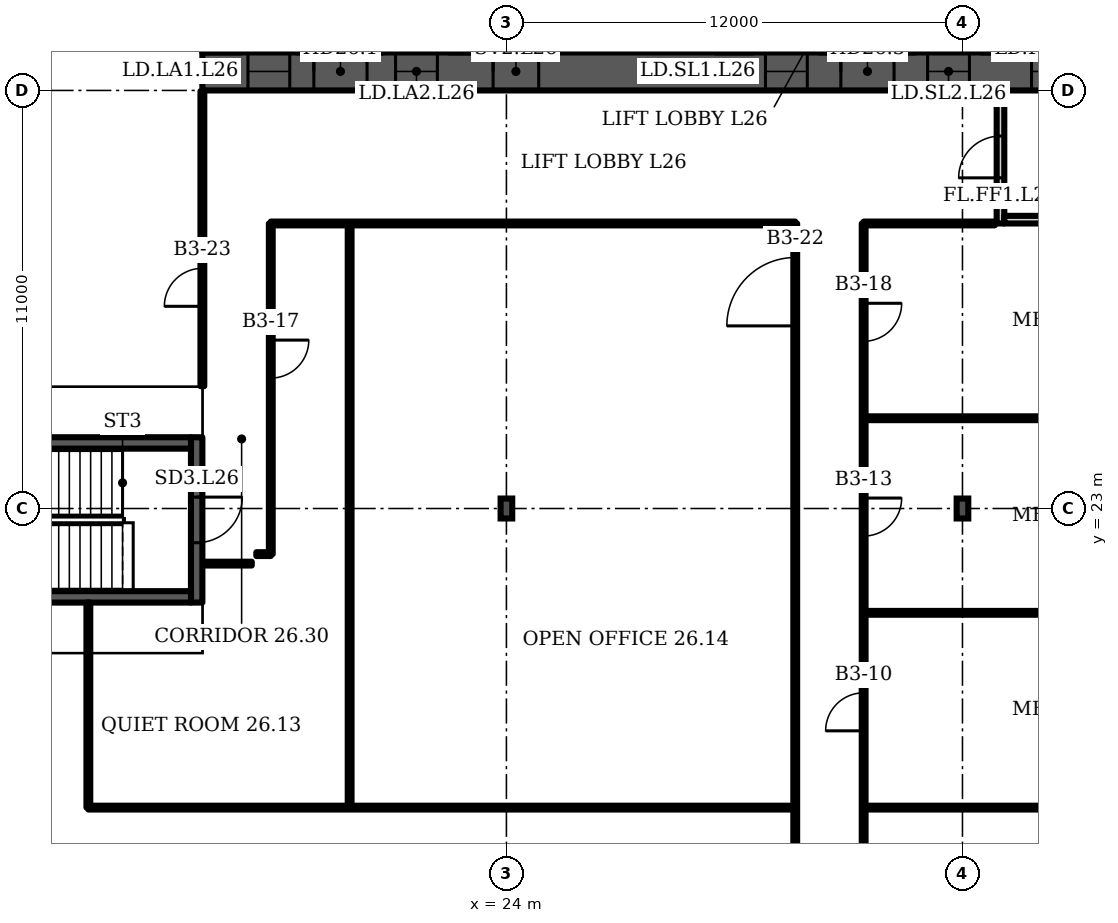
"""IFC4 building model, lengths in metres.
Left out: names, types, materials, properties, quantities, classifications, styles, units other than length and angle.
Written with IfcOpenShell. Run it as: python <this file> out.ifc"""

import sys

from ifc_helpers import new_model, si_unit, direction, frame, frame_2d, origin, origin_2d, place, context, subcontext, project, spatial, rectangle, i_section, extrude, element, fill, save


model = new_model("IFC4")
c1 = context("Model", 3, precision=1e-05, world=origin(), true_north=direction((0.0, 1.0)))
c2 = subcontext(c1, "Body", "Model", "MODEL_VIEW")
j1 = project(units=[si_unit("LENGTHUNIT", "METRE"), si_unit("PLANEANGLEUNIT", "RADIAN")], contexts=[c1])
p1 = place(None, origin())
s1 = spatial("IfcSite", under=j1, at=p1, CompositionType="ELEMENT")
p2 = place(p1, origin())
s2 = spatial("IfcBuilding", under=s1, at=p2, CompositionType="ELEMENT")
p3 = place(p2, frame((0.0, 0.0, 114.7)))
s3 = spatial("IfcBuildingStorey", under=s2, at=p3, CompositionType="ELEMENT", Elevation=114.7)
p4 = place(p3, frame((16.0, 34.5, 0.0), z_axis=(0.0, 0.0, 1.0), x_axis=(1.0, 0.0, 0.0)))
e1 = element("IfcWall", 1, at=p4, inside=s3, PredefinedType="SHEAR", context=c2, shape_type="SweptSolid", body=[
    extrude(rectangle(XDim=49.0, YDim=1.0, at=frame_2d((24.5, 0.0))), origin(), (0.0, 0.0, 1.0), 3.6),
])
p5 = place(p4, frame((1.2, 0.0, 0.0)))
e2 = element("IfcOpeningElement", 2, at=p5, cuts=e1, PredefinedType="OPENING", context=c2, shape_type="SweptSolid", body=[
    extrude(rectangle(XDim=1.1, YDim=2.1, at=frame_2d((0.55, 1.05))), frame((0.0, 0.51, 0.0), z_axis=(0.0, -1.0, 0.0), x_axis=(1.0, 0.0, 0.0)), (0.0, 0.0, 1.0), 1.02),
])
p6 = place(p4, frame((5.083, 0.0, 0.0)))
e3 = element("IfcOpeningElement", 3, at=p6, cuts=e1, PredefinedType="OPENING", context=c2, shape_type="SweptSolid", body=[
    extrude(rectangle(XDim=1.1, YDim=2.1, at=frame_2d((0.55, 1.05))), frame((0.0, 0.51, 0.0), z_axis=(0.0, -1.0, 0.0), x_axis=(1.0, 0.0, 0.0)), (0.0, 0.0, 1.0), 1.02),
])
p7 = place(p4, frame((2.933, 0.0, 0.0)))
e4 = element("IfcOpeningElement", 4, at=p7, cuts=e1, PredefinedType="OPENING", context=c2, shape_type="SweptSolid", body=[
    extrude(rectangle(XDim=1.4, YDim=2.1, at=frame_2d((0.7, 1.05))), frame((0.0, 0.51, 0.0), z_axis=(0.0, -1.0, 0.0), x_axis=(1.0, 0.0, 0.0)), (0.0, 0.0, 1.0), 1.02),
])
p8 = place(p4, frame((7.65, 0.0, 0.0)))
e5 = element("IfcOpeningElement", 5, at=p8, cuts=e1, PredefinedType="OPENING", context=c2, shape_type="SweptSolid", body=[
    extrude(rectangle(XDim=1.2, YDim=2.1, at=frame_2d((0.6, 1.05))), frame((0.0, 0.51, 0.0), z_axis=(0.0, -1.0, 0.0), x_axis=(1.0, 0.0, 0.0)), (0.0, 0.0, 1.0), 1.02),
])
p9 = place(p4, frame((14.817, 0.0, 0.0)))
e6 = element("IfcOpeningElement", 6, at=p9, cuts=e1, PredefinedType="OPENING", context=c2, shape_type="SweptSolid", body=[
    extrude(rectangle(XDim=1.1, YDim=2.1, at=frame_2d((0.55, 1.05))), frame((0.0, 0.51, 0.0), z_axis=(0.0, -1.0, 0.0), x_axis=(1.0, 0.0, 0.0)), (0.0, 0.0, 1.0), 1.02),
])
p10 = place(p4, frame((19.083, 0.0, 0.0)))
e7 = element("IfcOpeningElement", 7, at=p10, cuts=e1, PredefinedType="OPENING", context=c2, shape_type="SweptSolid", body=[
    extrude(rectangle(XDim=1.1, YDim=2.1, at=frame_2d((0.55, 1.05))), frame((0.0, 0.51, 0.0), z_axis=(0.0, -1.0, 0.0), x_axis=(1.0, 0.0, 0.0)), (0.0, 0.0, 1.0), 1.02),
])
p11 = place(p4, frame((16.8, 0.0, 0.0)))
e8 = element("IfcOpeningElement", 8, at=p11, cuts=e1, PredefinedType="OPENING", context=c2, shape_type="SweptSolid", body=[
    extrude(rectangle(XDim=1.4, YDim=2.1, at=frame_2d((0.7, 1.05))), frame((0.0, 0.51, 0.0), z_axis=(0.0, -1.0, 0.0), x_axis=(1.0, 0.0, 0.0)), (0.0, 0.0, 1.0), 1.02),
])
p12 = place(p4, frame((21.817, 0.0, 0.0)))
e9 = element("IfcOpeningElement", 9, at=p12, cuts=e1, PredefinedType="OPENING", context=c2, shape_type="SweptSolid", body=[
    extrude(rectangle(XDim=1.1, YDim=2.1, at=frame_2d((0.55, 1.05))), frame((0.0, 0.51, 0.0), z_axis=(0.0, -1.0, 0.0), x_axis=(1.0, 0.0, 0.0)), (0.0, 0.0, 1.0), 1.02),
])
p13 = place(p4, frame((26.083, 0.0, 0.0)))
e10 = element("IfcOpeningElement", 10, at=p13, cuts=e1, PredefinedType="OPENING", context=c2, shape_type="SweptSolid", body=[
    extrude(rectangle(XDim=1.1, YDim=2.1, at=frame_2d((0.55, 1.05))), frame((0.0, 0.51, 0.0), z_axis=(0.0, -1.0, 0.0), x_axis=(1.0, 0.0, 0.0)), (0.0, 0.0, 1.0), 1.02),
])
p14 = place(p4, frame((33.15, 0.0, 0.0)))
e11 = element("IfcOpeningElement", 11, at=p14, cuts=e1, PredefinedType="OPENING", context=c2, shape_type="SweptSolid", body=[
    extrude(rectangle(XDim=1.2, YDim=2.1, at=frame_2d((0.6, 1.05))), frame((0.0, 0.51, 0.0), z_axis=(0.0, -1.0, 0.0), x_axis=(1.0, 0.0, 0.0)), (0.0, 0.0, 1.0), 1.02),
])
p15 = place(p4, frame((37.8, 0.0, 0.0)))
e12 = element("IfcOpeningElement", 12, at=p15, cuts=e1, PredefinedType="OPENING", context=c2, shape_type="SweptSolid", body=[
    extrude(rectangle(XDim=1.4, YDim=2.1, at=frame_2d((0.7, 1.05))), frame((0.0, 0.51, 0.0), z_axis=(0.0, -1.0, 0.0), x_axis=(1.0, 0.0, 0.0)), (0.0, 0.0, 1.0), 1.02),
])
p16 = place(p4, frame((42.817, 0.0, 0.0)))
e13 = element("IfcOpeningElement", 13, at=p16, cuts=e1, PredefinedType="OPENING", context=c2, shape_type="SweptSolid", body=[
    extrude(rectangle(XDim=1.1, YDim=2.1, at=frame_2d((0.55, 1.05))), frame((0.0, 0.51, 0.0), z_axis=(0.0, -1.0, 0.0), x_axis=(1.0, 0.0, 0.0)), (0.0, 0.0, 1.0), 1.02),
])
p17 = place(p4, frame((46.7, 0.0, 0.0)))
e14 = element("IfcOpeningElement", 14, at=p17, cuts=e1, PredefinedType="OPENING", context=c2, shape_type="SweptSolid", body=[
    extrude(rectangle(XDim=1.1, YDim=2.1, at=frame_2d((0.55, 1.05))), frame((0.0, 0.51, 0.0), z_axis=(0.0, -1.0, 0.0), x_axis=(1.0, 0.0, 0.0)), (0.0, 0.0, 1.0), 1.02),
])
p18 = place(p4, frame((44.667, 0.0, 0.0)))
e15 = element("IfcOpeningElement", 15, at=p18, cuts=e1, PredefinedType="OPENING", context=c2, shape_type="SweptSolid", body=[
    extrude(rectangle(XDim=1.4, YDim=2.1, at=frame_2d((0.7, 1.05))), frame((0.0, 0.51, 0.0), z_axis=(0.0, -1.0, 0.0), x_axis=(1.0, 0.0, 0.0)), (0.0, 0.0, 1.0), 1.02),
])
for number, where, z_axis, x_axis in (
    (16, (24.0, 23.0, 0.0), (0.0, 0.0, 1.0), (1.0, 0.0, 0.0)),
    (17, (36.0, 23.0, 0.0), (0.0, 0.0, 1.0), (1.0, 0.0, 0.0)),
):
    element("IfcColumn", number, at=place(p3, frame(where, z_axis=z_axis, x_axis=x_axis)), inside=s3, PredefinedType="COLUMN", context=c2, shape_type="SweptSolid", body=[
        extrude(i_section(OverallWidth=0.306, OverallDepth=0.524, WebThickness=0.021, FlangeThickness=0.04, FilletRadius=0.027, at=origin_2d()), origin(), (0.0, 0.0, 1.0), 3.6),
    ])
p19 = place(p3, frame((37.0, 30.5, 0.0), z_axis=(0.0, 0.0, 1.0), x_axis=(0.0, 1.0, 0.0)))
e18 = element("IfcWall", 18, at=p19, inside=s3, PredefinedType="PARTITIONING", context=c2, shape_type="SweptSolid", body=[
    extrude(rectangle(XDim=3.5, YDim=0.2, at=frame_2d((1.75, 0.0))), origin(), (0.0, 0.0, 1.0), 3.2),
])
p20 = place(p19, frame((1.2, 0.0, 0.0)))
e19 = element("IfcOpeningElement", 19, at=p20, cuts=e18, PredefinedType="OPENING", context=c2, shape_type="SweptSolid", body=[
    extrude(rectangle(XDim=1.1, YDim=2.1, at=frame_2d((0.55, 1.05))), frame((0.0, 0.11, 0.0), z_axis=(0.0, -1.0, 0.0), x_axis=(1.0, 0.0, 0.0)), (0.0, 0.0, 1.0), 0.22),
])
p21 = place(p3, frame((37.1, 30.6, 0.0), z_axis=(0.0, 0.0, 1.0), x_axis=(1.0, 0.0, 0.0)))
e20 = element("IfcWall", 20, at=p21, inside=s3, PredefinedType="PARTITIONING", context=c2, shape_type="SweptSolid", body=[
    extrude(rectangle(XDim=2.8, YDim=0.2, at=frame_2d((1.4, 0.0))), origin(), (0.0, 0.0, 1.0), 3.2),
])
p22 = place(p3, frame((15.85, 20.525, 0.0), z_axis=(0.0, 0.0, 1.0), x_axis=(0.0, 1.0, 0.0)))
e21 = element("IfcWall", 21, at=p22, inside=s3, PredefinedType="SHEAR", context=c2, shape_type="SweptSolid", body=[
    extrude(rectangle(XDim=4.35, YDim=0.3, at=frame_2d((2.175, 0.0))), origin(), (0.0, 0.0, 1.0), 3.2),
])
p23 = place(p22, frame((1.575, 0.0, 0.0)))
e22 = element("IfcOpeningElement", 22, at=p23, cuts=e21, PredefinedType="OPENING", context=c2, shape_type="SweptSolid", body=[
    extrude(rectangle(XDim=1.2, YDim=2.1, at=frame_2d((0.6, 1.05))), frame((0.0, 0.16, 0.0), z_axis=(0.0, -1.0, 0.0), x_axis=(1.0, 0.0, 0.0)), (0.0, 0.0, 1.0), 0.32),
])
p24 = place(p3, frame((13.0, 15.13, 0.0), z_axis=(0.0, 0.0, 1.0), x_axis=(0.0, 1.0, 0.0)))
e23 = element("IfcWall", 23, at=p24, inside=s3, PredefinedType="PARTITIONING", context=c2, shape_type="SweptSolid", body=[
    extrude(rectangle(XDim=5.395, YDim=0.1, at=frame_2d((2.698, 0.0))), origin(), (0.0, 0.0, 1.0), 3.2),
])
p25 = place(p3, frame((13.0, 15.13, 0.0), z_axis=(0.0, 0.0, 1.0), x_axis=(1.0, 0.0, 0.0)))
e24 = element("IfcWall", 24, at=p25, inside=s3, PredefinedType="PARTITIONING", context=c2, shape_type="SweptSolid", body=[
    extrude(rectangle(XDim=18.6, YDim=0.1, at=frame_2d((9.3, 0.0))), origin(), (0.0, 0.0, 1.0), 3.2),
])
p26 = place(p3, frame((16.0, 26.22, 0.0), z_axis=(0.0, 0.0, 1.0), x_axis=(0.0, 1.0, 0.0)))
e25 = element("IfcWall", 25, at=p26, inside=s3, PredefinedType="PARTITIONING", context=c2, shape_type="SweptSolid", body=[
    extrude(rectangle(XDim=7.76, YDim=0.1, at=frame_2d((3.88, 0.0))), origin(), (0.0, 0.0, 1.0), 3.2),
])
p27 = place(p26, frame((2.1, 0.0, 0.0)))
e26 = element("IfcOpeningElement", 26, at=p27, cuts=e25, PredefinedType="OPENING", context=c2, shape_type="SweptSolid", body=[
    extrude(rectangle(XDim=1.0, YDim=2.1, at=frame_2d((0.5, 1.05))), frame((0.0, 0.06, 0.0), z_axis=(0.0, -1.0, 0.0), x_axis=(1.0, 0.0, 0.0)), (0.0, 0.0, 1.0), 0.12),
])
p28 = place(p3, frame((16.02, 21.55, 0.0), z_axis=(0.0, 0.0, 1.0), x_axis=(1.0, 0.0, 0.0)))
e27 = element("IfcWall", 27, at=p28, inside=s3, PredefinedType="PARTITIONING", context=c2, shape_type="SweptSolid", body=[
    extrude(rectangle(XDim=1.28, YDim=0.1, at=frame_2d((0.64, 0.0))), origin(), (0.0, 0.0, 1.0), 3.2),
])
p29 = place(p3, frame((17.42, 21.8, 0.0), z_axis=(0.0, 0.0, 1.0), x_axis=(1.0, 0.0, 0.0)))
e28 = element("IfcWall", 28, at=p29, inside=s3, PredefinedType="PARTITIONING", context=c2, shape_type="SweptSolid", body=[
    extrude(rectangle(XDim=0.38, YDim=0.1, at=frame_2d((0.19, 0.0))), origin(), (0.0, 0.0, 1.0), 3.2),
])
p30 = place(p3, frame((17.8, 21.8, 0.0), z_axis=(0.0, 0.0, 1.0), x_axis=(0.0, 1.0, 0.0)))
e29 = element("IfcWall", 29, at=p30, inside=s3, PredefinedType="PARTITIONING", context=c2, shape_type="SweptSolid", body=[
    extrude(rectangle(XDim=8.7, YDim=0.1, at=frame_2d((4.35, 0.0))), origin(), (0.0, 0.0, 1.0), 3.2),
])
p31 = place(p30, frame((4.631, 0.0, 0.0)))
e30 = element("IfcOpeningElement", 30, at=p31, cuts=e29, PredefinedType="OPENING", context=c2, shape_type="SweptSolid", body=[
    extrude(rectangle(XDim=1.0, YDim=2.1, at=frame_2d((0.5, 1.05))), frame((0.0, 0.06, 0.0), z_axis=(0.0, -1.0, 0.0), x_axis=(1.0, 0.0, 0.0)), (0.0, 0.0, 1.0), 0.12),
])
p32 = place(p3, frame((17.8, 30.5, 0.0), z_axis=(0.0, 0.0, 1.0), x_axis=(1.0, 0.0, 0.0)))
e31 = element("IfcWall", 31, at=p32, inside=s3, PredefinedType="PARTITIONING", context=c2, shape_type="SweptSolid", body=[
    extrude(rectangle(XDim=13.8, YDim=0.1, at=frame_2d((6.9, 0.0))), origin(), (0.0, 0.0, 1.0), 3.2),
])
p33 = place(p3, frame((19.875, 15.13, 0.0), z_axis=(0.0, 0.0, 1.0), x_axis=(0.0, 1.0, 0.0)))
e32 = element("IfcWall", 32, at=p33, inside=s3, PredefinedType="PARTITIONING", context=c2, shape_type="SweptSolid", body=[
    extrude(rectangle(XDim=15.37, YDim=0.1, at=frame_2d((7.685, 0.0))), origin(), (0.0, 0.0, 1.0), 3.2),
])
p34 = place(p3, frame((31.6, 0.56, 0.0), z_axis=(0.0, 0.0, 1.0), x_axis=(0.0, 1.0, 0.0)))
e33 = element("IfcWall", 33, at=p34, inside=s3, PredefinedType="PARTITIONING", context=c2, shape_type="SweptSolid", body=[
    extrude(rectangle(XDim=29.94, YDim=0.1, at=frame_2d((14.97, 0.0))), origin(), (0.0, 0.0, 1.0), 3.2),
])
p35 = place(p34, frame((6.75, 0.0, 0.0)))
e34 = element("IfcOpeningElement", 34, at=p35, cuts=e33, PredefinedType="OPENING", context=c2, shape_type="SweptSolid", body=[
    extrude(rectangle(XDim=1.0, YDim=2.1, at=frame_2d((0.5, 1.05))), frame((0.0, 0.06, 0.0), z_axis=(0.0, -1.0, 0.0), x_axis=(1.0, 0.0, 0.0)), (0.0, 0.0, 1.0), 0.12),
])
p36 = place(p34, frame((27.245, 0.0, 0.0)))
e35 = element("IfcOpeningElement", 35, at=p36, cuts=e33, PredefinedType="OPENING", context=c2, shape_type="SweptSolid", body=[
    extrude(rectangle(XDim=1.8, YDim=2.1, at=frame_2d((0.9, 1.05))), frame((0.0, 0.06, 0.0), z_axis=(0.0, -1.0, 0.0), x_axis=(1.0, 0.0, 0.0)), (0.0, 0.0, 1.0), 0.12),
])
p37 = place(p3, frame((33.4, 10.22, 0.0), z_axis=(0.0, 0.0, 1.0), x_axis=(0.0, 1.0, 0.0)))
e36 = element("IfcWall", 36, at=p37, inside=s3, PredefinedType="PARTITIONING", context=c2, shape_type="SweptSolid", body=[
    extrude(rectangle(XDim=20.28, YDim=0.1, at=frame_2d((10.14, 0.0))), origin(), (0.0, 0.0, 1.0), 3.2),
])
p38 = place(p37, frame((6.93, 0.0, 0.0)))
e37 = element("IfcOpeningElement", 37, at=p38, cuts=e36, PredefinedType="OPENING", context=c2, shape_type="SweptSolid", body=[
    extrude(rectangle(XDim=1.0, YDim=2.1, at=frame_2d((0.5, 1.05))), frame((0.0, 0.06, 0.0), z_axis=(0.0, -1.0, 0.0), x_axis=(1.0, 0.0, 0.0)), (0.0, 0.0, 1.0), 0.12),
])
p39 = place(p37, frame((12.055, 0.0, 0.0)))
e38 = element("IfcOpeningElement", 38, at=p39, cuts=e36, PredefinedType="OPENING", context=c2, shape_type="SweptSolid", body=[
    extrude(rectangle(XDim=1.0, YDim=2.1, at=frame_2d((0.5, 1.05))), frame((0.0, 0.06, 0.0), z_axis=(0.0, -1.0, 0.0), x_axis=(1.0, 0.0, 0.0)), (0.0, 0.0, 1.0), 0.12),
])
p40 = place(p37, frame((17.18, 0.0, 0.0)))
e39 = element("IfcOpeningElement", 39, at=p40, cuts=e36, PredefinedType="OPENING", context=c2, shape_type="SweptSolid", body=[
    extrude(rectangle(XDim=1.0, YDim=2.1, at=frame_2d((0.5, 1.05))), frame((0.0, 0.06, 0.0), z_axis=(0.0, -1.0, 0.0), x_axis=(1.0, 0.0, 0.0)), (0.0, 0.0, 1.0), 0.12),
])
p41 = place(p3, frame((33.4, 15.13, 0.0), z_axis=(0.0, 0.0, 1.0), x_axis=(1.0, 0.0, 0.0)))
e40 = element("IfcWall", 40, at=p41, inside=s3, PredefinedType="PARTITIONING", context=c2, shape_type="SweptSolid", body=[
    extrude(rectangle(XDim=24.2, YDim=0.1, at=frame_2d((12.1, 0.0))), origin(), (0.0, 0.0, 1.0), 3.2),
])
for number, where, z_axis, x_axis in (
    (41, (33.4, 20.255, 0.0), (0.0, 0.0, 1.0), (1.0, 0.0, 0.0)),
    (42, (33.4, 25.375, 0.0), (0.0, 0.0, 1.0), (1.0, 0.0, 0.0)),
):
    element("IfcWall", number, at=place(p3, frame(where, z_axis=z_axis, x_axis=x_axis)), inside=s3, PredefinedType="PARTITIONING", context=c2, shape_type="SweptSolid", body=[
        extrude(rectangle(XDim=13.975, YDim=0.1, at=frame_2d((6.988, 0.0))), origin(), (0.0, 0.0, 1.0), 3.2),
    ])
p42 = place(p3, frame((33.4, 30.5, 0.0), z_axis=(0.0, 0.0, 1.0), x_axis=(1.0, 0.0, 0.0)))
e43 = element("IfcWall", 43, at=p42, inside=s3, PredefinedType="PARTITIONING", context=c2, shape_type="SweptSolid", body=[
    extrude(rectangle(XDim=3.45, YDim=0.1, at=frame_2d((1.725, 0.0))), origin(), (0.0, 0.0, 1.0), 3.2),
])
for number, where, z_axis, x_axis in (
    (44, (8.2, 20.675, 0.0), (0.0, 0.0, 1.0), (1.0, 0.0, 0.0)),
    (45, (8.2, 24.725, 0.0), (0.0, 0.0, 1.0), (1.0, 0.0, 0.0)),
):
    element("IfcWall", number, at=place(p3, frame(where, z_axis=z_axis, x_axis=x_axis)), inside=s3, PredefinedType="SHEAR", context=c2, shape_type="SweptSolid", body=[
        extrude(rectangle(XDim=7.5, YDim=0.3, at=frame_2d((3.75, 0.0))), origin(), (0.0, 0.0, 1.0), 3.2),
    ])
p43 = place(p5, origin())
e46 = element("IfcDoor", 46, at=p43, inside=s3, OperationType="DOUBLE_DOOR_SLIDING", PredefinedType="DOOR", context=c2, shape_type="SweptSolid", body=[
    extrude(rectangle(XDim=1.1, YDim=2.1, at=frame_2d((0.55, 1.05))), frame((0.0, 0.025, 0.0), z_axis=(0.0, -1.0, 0.0), x_axis=(1.0, 0.0, 0.0)), (0.0, 0.0, 1.0), 0.05),
])
fill(e2, e46)
p44 = place(p6, origin())
e47 = element("IfcDoor", 47, at=p44, inside=s3, OperationType="DOUBLE_DOOR_SLIDING", PredefinedType="DOOR", context=c2, shape_type="SweptSolid", body=[
    extrude(rectangle(XDim=1.1, YDim=2.1, at=frame_2d((0.55, 1.05))), frame((0.0, 0.025, 0.0), z_axis=(0.0, -1.0, 0.0), x_axis=(1.0, 0.0, 0.0)), (0.0, 0.0, 1.0), 0.05),
])
fill(e3, e47)
p45 = place(p7, origin())
e48 = element("IfcDoor", 48, at=p45, inside=s3, OperationType="DOUBLE_DOOR_SINGLE_SWING", PredefinedType="DOOR", context=c2, shape_type="SweptSolid", body=[
    extrude(rectangle(XDim=1.4, YDim=2.1, at=frame_2d((0.7, 1.05))), frame((0.0, 0.025, 0.0), z_axis=(0.0, -1.0, 0.0), x_axis=(1.0, 0.0, 0.0)), (0.0, 0.0, 1.0), 0.05),
])
fill(e4, e48)
p46 = place(p8, origin())
e49 = element("IfcDoor", 49, at=p46, inside=s3, OperationType="SINGLE_SWING_LEFT", PredefinedType="DOOR", context=c2, shape_type="SweptSolid", body=[
    extrude(rectangle(XDim=1.2, YDim=2.1, at=frame_2d((0.6, 1.05))), frame((0.0, 0.025, 0.0), z_axis=(0.0, -1.0, 0.0), x_axis=(1.0, 0.0, 0.0)), (0.0, 0.0, 1.0), 0.05),
])
fill(e5, e49)
p47 = place(p9, origin())
e50 = element("IfcDoor", 50, at=p47, inside=s3, OperationType="DOUBLE_DOOR_SLIDING", PredefinedType="DOOR", context=c2, shape_type="SweptSolid", body=[
    extrude(rectangle(XDim=1.1, YDim=2.1, at=frame_2d((0.55, 1.05))), frame((0.0, 0.025, 0.0), z_axis=(0.0, -1.0, 0.0), x_axis=(1.0, 0.0, 0.0)), (0.0, 0.0, 1.0), 0.05),
])
fill(e6, e50)
p48 = place(p10, origin())
e51 = element("IfcDoor", 51, at=p48, inside=s3, OperationType="DOUBLE_DOOR_SLIDING", PredefinedType="DOOR", context=c2, shape_type="SweptSolid", body=[
    extrude(rectangle(XDim=1.1, YDim=2.1, at=frame_2d((0.55, 1.05))), frame((0.0, 0.025, 0.0), z_axis=(0.0, -1.0, 0.0), x_axis=(1.0, 0.0, 0.0)), (0.0, 0.0, 1.0), 0.05),
])
fill(e7, e51)
p49 = place(p11, origin())
e52 = element("IfcDoor", 52, at=p49, inside=s3, OperationType="DOUBLE_DOOR_SINGLE_SWING", PredefinedType="DOOR", context=c2, shape_type="SweptSolid", body=[
    extrude(rectangle(XDim=1.4, YDim=2.1, at=frame_2d((0.7, 1.05))), frame((0.0, 0.025, 0.0), z_axis=(0.0, -1.0, 0.0), x_axis=(1.0, 0.0, 0.0)), (0.0, 0.0, 1.0), 0.05),
])
fill(e8, e52)
p50 = place(p12, origin())
e53 = element("IfcDoor", 53, at=p50, inside=s3, OperationType="DOUBLE_DOOR_SLIDING", PredefinedType="DOOR", context=c2, shape_type="SweptSolid", body=[
    extrude(rectangle(XDim=1.1, YDim=2.1, at=frame_2d((0.55, 1.05))), frame((0.0, 0.025, 0.0), z_axis=(0.0, -1.0, 0.0), x_axis=(1.0, 0.0, 0.0)), (0.0, 0.0, 1.0), 0.05),
])
fill(e9, e53)
p51 = place(p20, origin())
e54 = element("IfcDoor", 54, at=p51, inside=s3, OperationType="SINGLE_SWING_LEFT", PredefinedType="DOOR", context=c2, shape_type="SweptSolid", body=[
    extrude(rectangle(XDim=1.1, YDim=2.1, at=frame_2d((0.55, 1.05))), frame((0.0, 0.025, 0.0), z_axis=(0.0, -1.0, 0.0), x_axis=(1.0, 0.0, 0.0)), (0.0, 0.0, 1.0), 0.05),
])
fill(e19, e54)
p52 = place(p23, origin())
e55 = element("IfcDoor", 55, at=p52, inside=s3, OperationType="SINGLE_SWING_RIGHT", PredefinedType="DOOR", context=c2, shape_type="SweptSolid", body=[
    extrude(rectangle(XDim=1.2, YDim=2.1, at=frame_2d((0.6, 1.05))), frame((0.0, 0.025, 0.0), z_axis=(0.0, -1.0, 0.0), x_axis=(1.0, 0.0, 0.0)), (0.0, 0.0, 1.0), 0.05),
])
fill(e22, e55)
p53 = place(p38, origin())
e56 = element("IfcDoor", 56, at=p53, inside=s3, OperationType="SINGLE_SWING_LEFT", PredefinedType="DOOR", context=c2, shape_type="SweptSolid", body=[
    extrude(rectangle(XDim=1.0, YDim=2.1, at=frame_2d((0.5, 1.05))), frame((0.0, 0.025, 0.0), z_axis=(0.0, -1.0, 0.0), x_axis=(1.0, 0.0, 0.0)), (0.0, 0.0, 1.0), 0.05),
])
fill(e37, e56)
p54 = place(p39, origin())
e57 = element("IfcDoor", 57, at=p54, inside=s3, OperationType="SINGLE_SWING_RIGHT", PredefinedType="DOOR", context=c2, shape_type="SweptSolid", body=[
    extrude(rectangle(XDim=1.0, YDim=2.1, at=frame_2d((0.5, 1.05))), frame((0.0, 0.025, 0.0), z_axis=(0.0, -1.0, 0.0), x_axis=(1.0, 0.0, 0.0)), (0.0, 0.0, 1.0), 0.05),
])
fill(e38, e57)
p55 = place(p31, origin())
e58 = element("IfcDoor", 58, at=p55, inside=s3, OperationType="SINGLE_SWING_RIGHT", PredefinedType="DOOR", context=c2, shape_type="SweptSolid", body=[
    extrude(rectangle(XDim=1.0, YDim=2.1, at=frame_2d((0.5, 1.05))), frame((0.0, 0.025, 0.0), z_axis=(0.0, -1.0, 0.0), x_axis=(1.0, 0.0, 0.0)), (0.0, 0.0, 1.0), 0.05),
])
fill(e30, e58)
p56 = place(p40, origin())
e59 = element("IfcDoor", 59, at=p56, inside=s3, OperationType="SINGLE_SWING_RIGHT", PredefinedType="DOOR", context=c2, shape_type="SweptSolid", body=[
    extrude(rectangle(XDim=1.0, YDim=2.1, at=frame_2d((0.5, 1.05))), frame((0.0, 0.025, 0.0), z_axis=(0.0, -1.0, 0.0), x_axis=(1.0, 0.0, 0.0)), (0.0, 0.0, 1.0), 0.05),
])
fill(e39, e59)
p57 = place(p36, origin())
e60 = element("IfcDoor", 60, at=p57, inside=s3, OperationType="DOUBLE_DOOR_SINGLE_SWING", PredefinedType="DOOR", context=c2, shape_type="SweptSolid", body=[
    extrude(rectangle(XDim=1.8, YDim=2.1, at=frame_2d((0.9, 1.05))), frame((0.0, 0.025, 0.0), z_axis=(0.0, -1.0, 0.0), x_axis=(1.0, 0.0, 0.0)), (0.0, 0.0, 1.0), 0.05),
])
fill(e35, e60)
p58 = place(p27, origin())
e61 = element("IfcDoor", 61, at=p58, inside=s3, OperationType="SINGLE_SWING_LEFT", PredefinedType="DOOR", context=c2, shape_type="SweptSolid", body=[
    extrude(rectangle(XDim=1.0, YDim=2.1, at=frame_2d((0.5, 1.05))), frame((0.0, 0.025, 0.0), z_axis=(0.0, -1.0, 0.0), x_axis=(1.0, 0.0, 0.0)), (0.0, 0.0, 1.0), 0.05),
])
fill(e26, e61)
save(model, sys.argv[1])
